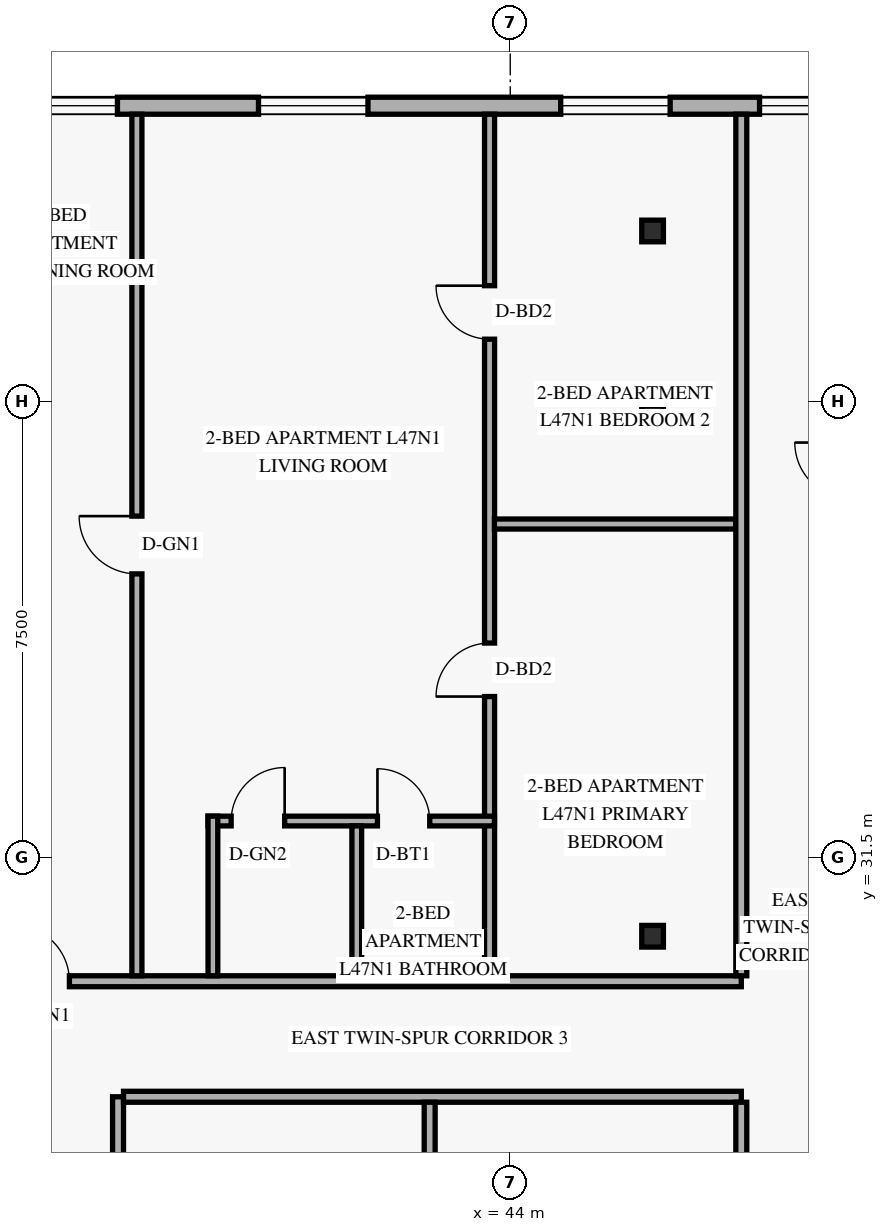
"""IFC4 building model, lengths in metres.
Left out: names, types, materials, properties, quantities, classifications, styles, units other than length and angle.
Written with IfcOpenShell. Run it as: python <this file> out.ifc"""

import sys

from ifc_helpers import new_model, si_unit, direction, frame, frame_2d, origin, origin_2d, place, context, subcontext, project, spatial, rectangle, hollow_rectangle, extrude, element, fill, save


model = new_model("IFC4")
c1 = context("Model", 3, precision=1e-05, world=origin(), true_north=direction((0.0, 1.0)))
c2 = subcontext(c1, "Body", "Model", "MODEL_VIEW")
j1 = project(units=[si_unit("LENGTHUNIT", "METRE"), si_unit("PLANEANGLEUNIT", "RADIAN")], contexts=[c1])
p1 = place(None, origin())
s1 = spatial("IfcSite", under=j1, at=p1, CompositionType="ELEMENT")
p2 = place(p1, origin())
s2 = spatial("IfcBuilding", under=s1, at=p2, CompositionType="ELEMENT")
p3 = place(p2, frame((0.0, 0.0, 181.2)))
s3 = spatial("IfcBuildingStorey", under=s2, at=p3, CompositionType="ELEMENT", Elevation=181.2)
for number, where, z_axis, x_axis in (
    (1, (46.278, 30.2, 0.0), (0.035, 0.0, 0.999), (0.0, 1.0, 0.0)),
    (2, (46.278, 38.75, 0.0), (0.035, 0.0, 0.999), (0.0, 1.0, 0.0)),
    (3, (46.278, 41.8, 0.0), (0.035, 0.0, 0.999), (0.0, 1.0, 0.0)),
):
    element("IfcColumn", number, at=place(p3, frame(where, z_axis=z_axis, x_axis=x_axis)), inside=s3, PredefinedType="COLUMN", context=c2, shape_type="SweptSolid", body=[
        extrude(hollow_rectangle(XDim=0.356, YDim=0.356, WallThickness=0.016, at=origin_2d()), origin(), (0.0, 0.0, 1.0), 3.602),
    ])
p4 = place(p3, frame((54.98, 43.86, 0.0), z_axis=(0.0, 0.0, 1.0), x_axis=(-1.0, 0.0, 0.0)))
e4 = element("IfcWall", 4, at=p4, inside=s3, PredefinedType="SOLIDWALL", context=c2, shape_type="SweptSolid", body=[
    extrude(rectangle(XDim=33.76, YDim=0.28, at=frame_2d((16.88, 0.0))), origin(), (0.0, 0.0, 1.0), 3.36),
])
p5 = place(p4, frame((28.055, 0.0, 0.85)))
e5 = element("IfcOpeningElement", 5, at=p5, cuts=e4, PredefinedType="OPENING", context=c2, shape_type="SweptSolid", body=[
    extrude(rectangle(XDim=1.8, YDim=1.6, at=frame_2d((0.9, 0.8))), frame((0.0, 0.15, 0.0), z_axis=(0.0, -1.0, 0.0), x_axis=(1.0, 0.0, 0.0)), (0.0, 0.0, 1.0), 0.3),
])
p6 = place(p4, frame((21.17, 0.0, 0.85)))
e6 = element("IfcOpeningElement", 6, at=p6, cuts=e4, PredefinedType="OPENING", context=c2, shape_type="SweptSolid", body=[
    extrude(rectangle(XDim=1.8, YDim=1.6, at=frame_2d((0.9, 0.8))), frame((0.0, 0.15, 0.0), z_axis=(0.0, -1.0, 0.0), x_axis=(1.0, 0.0, 0.0)), (0.0, 0.0, 1.0), 0.3),
])
p7 = place(p4, frame((17.44, 0.0, 0.85)))
e7 = element("IfcOpeningElement", 7, at=p7, cuts=e4, PredefinedType="OPENING", context=c2, shape_type="SweptSolid", body=[
    extrude(rectangle(XDim=1.8, YDim=1.6, at=frame_2d((0.9, 0.8))), frame((0.0, 0.15, 0.0), z_axis=(0.0, -1.0, 0.0), x_axis=(1.0, 0.0, 0.0)), (0.0, 0.0, 1.0), 0.3),
])
p8 = place(p4, frame((13.32, 0.0, 0.85)))
e8 = element("IfcOpeningElement", 8, at=p8, cuts=e4, PredefinedType="OPENING", context=c2, shape_type="SweptSolid", body=[
    extrude(rectangle(XDim=1.8, YDim=1.6, at=frame_2d((0.9, 0.8))), frame((0.0, 0.15, 0.0), z_axis=(0.0, -1.0, 0.0), x_axis=(1.0, 0.0, 0.0)), (0.0, 0.0, 1.0), 0.3),
])
p9 = place(p4, frame((8.35, 0.0, 0.85)))
e9 = element("IfcOpeningElement", 9, at=p9, cuts=e4, PredefinedType="OPENING", context=c2, shape_type="SweptSolid", body=[
    extrude(rectangle(XDim=1.8, YDim=1.6, at=frame_2d((0.9, 0.8))), frame((0.0, 0.15, 0.0), z_axis=(0.0, -1.0, 0.0), x_axis=(1.0, 0.0, 0.0)), (0.0, 0.0, 1.0), 0.3),
])
p10 = place(p4, frame((5.68, 0.0, 0.85)))
e10 = element("IfcOpeningElement", 10, at=p10, cuts=e4, PredefinedType="OPENING", context=c2, shape_type="SweptSolid", body=[
    extrude(rectangle(XDim=1.2, YDim=1.5, at=frame_2d((0.6, 0.75))), frame((0.0, 0.15, 0.0), z_axis=(0.0, -1.0, 0.0), x_axis=(1.0, 0.0, 0.0)), (0.0, 0.0, 1.0), 0.3),
])
p11 = place(p4, frame((1.79, 0.0, 0.85)))
e11 = element("IfcOpeningElement", 11, at=p11, cuts=e4, PredefinedType="OPENING", context=c2, shape_type="SweptSolid", body=[
    extrude(rectangle(XDim=1.8, YDim=1.6, at=frame_2d((0.9, 0.8))), frame((0.0, 0.15, 0.0), z_axis=(0.0, -1.0, 0.0), x_axis=(1.0, 0.0, 0.0)), (0.0, 0.0, 1.0), 0.3),
])
p12 = place(p3, frame((37.55, 17.28, 0.0), z_axis=(0.0, 0.0, 1.0), x_axis=(0.0, 1.0, 0.0)))
e12 = element("IfcWall", 12, at=p12, inside=s3, PredefinedType="STANDARD", context=c2, shape_type="SweptSolid", body=[
    extrude(rectangle(XDim=10.28, YDim=0.18, at=frame_2d((5.14, 0.0))), origin(), (0.0, 0.0, 1.0), 2.73),
])
p13 = place(p12, frame((1.94, 0.0, 0.0)))
e13 = element("IfcOpeningElement", 13, at=p13, cuts=e12, PredefinedType="OPENING", context=c2, shape_type="SweptSolid", body=[
    extrude(rectangle(XDim=0.95, YDim=2.15, at=frame_2d((0.475, 1.075))), frame((0.0, 0.1, 0.0), z_axis=(0.0, -1.0, 0.0), x_axis=(1.0, 0.0, 0.0)), (0.0, 0.0, 1.0), 0.2),
])
p14 = place(p12, frame((6.99, 0.0, 0.0)))
e14 = element("IfcOpeningElement", 14, at=p14, cuts=e12, PredefinedType="OPENING", context=c2, shape_type="SweptSolid", body=[
    extrude(rectangle(XDim=0.95, YDim=2.15, at=frame_2d((0.475, 1.075))), frame((0.0, 0.1, 0.0), z_axis=(0.0, -1.0, 0.0), x_axis=(1.0, 0.0, 0.0)), (0.0, 0.0, 1.0), 0.2),
])
p15 = place(p3, frame((37.64, 27.56, 0.0), z_axis=(0.0, 0.0, 1.0), x_axis=(1.0, 0.0, 0.0)))
e15 = element("IfcWall", 15, at=p15, inside=s3, PredefinedType="STANDARD", context=c2, shape_type="SweptSolid", body=[
    extrude(rectangle(XDim=10.16, YDim=0.18, at=frame_2d((5.08, 0.0))), origin(), (0.0, 0.0, 1.0), 2.73),
])
p16 = place(p3, frame((35.51, 29.46, 0.0), z_axis=(0.0, 0.0, 1.0), x_axis=(1.0, 0.0, 0.0)))
e16 = element("IfcWall", 16, at=p16, inside=s3, PredefinedType="STANDARD", context=c2, shape_type="SweptSolid", body=[
    extrude(rectangle(XDim=12.29, YDim=0.18, at=frame_2d((6.145, 0.0))), origin(), (0.0, 0.0, 1.0), 2.73),
])
p17 = place(p16, frame((0.32, 0.0, 0.0)))
e17 = element("IfcOpeningElement", 17, at=p17, cuts=e16, PredefinedType="OPENING", context=c2, shape_type="SweptSolid", body=[
    extrude(rectangle(XDim=0.92, YDim=2.15, at=frame_2d((0.46, 1.075))), frame((0.0, 0.1, 0.0), z_axis=(0.0, -1.0, 0.0), x_axis=(1.0, 0.0, 0.0)), (0.0, 0.0, 1.0), 0.2),
])
p18 = place(p3, frame((43.66, 29.55, 0.0), z_axis=(0.0, 0.0, 1.0), x_axis=(0.0, 1.0, 0.0)))
e18 = element("IfcWall", 18, at=p18, inside=s3, PredefinedType="PARTITIONING", context=c2, shape_type="SweptSolid", body=[
    extrude(rectangle(XDim=14.17, YDim=0.165, at=frame_2d((7.085, 0.0))), origin(), (0.0, 0.0, 1.0), 2.73),
])
p19 = place(p18, frame((4.593, 0.0, 0.0)))
e19 = element("IfcOpeningElement", 19, at=p19, cuts=e18, PredefinedType="OPENING", context=c2, shape_type="SweptSolid", body=[
    extrude(rectangle(XDim=0.88, YDim=2.14, at=frame_2d((0.44, 1.07))), frame((0.0, 0.093, 0.0), z_axis=(0.0, -1.0, 0.0), x_axis=(1.0, 0.0, 0.0)), (0.0, 0.0, 1.0), 0.185),
])
p20 = place(p18, frame((10.47, 0.0, 0.0)))
e20 = element("IfcOpeningElement", 20, at=p20, cuts=e18, PredefinedType="OPENING", context=c2, shape_type="SweptSolid", body=[
    extrude(rectangle(XDim=0.88, YDim=2.14, at=frame_2d((0.44, 1.07))), frame((0.0, 0.093, 0.0), z_axis=(0.0, -1.0, 0.0), x_axis=(1.0, 0.0, 0.0)), (0.0, 0.0, 1.0), 0.185),
])
p21 = place(p3, frame((39.03, 32.095, 0.0), z_axis=(0.0, 0.0, 1.0), x_axis=(1.0, 0.0, 0.0)))
e21 = element("IfcWall", 21, at=p21, inside=s3, PredefinedType="PLUMBINGWALL", context=c2, shape_type="SweptSolid", body=[
    extrude(rectangle(XDim=4.71, YDim=0.16, at=frame_2d((2.355, 0.0))), origin(), (0.0, 0.0, 1.0), 3.36),
])
p22 = place(p21, frame((0.38, 0.0, 0.0)))
e22 = element("IfcOpeningElement", 22, at=p22, cuts=e21, PredefinedType="OPENING", context=c2, shape_type="SweptSolid", body=[
    extrude(rectangle(XDim=0.88, YDim=2.12, at=frame_2d((0.44, 1.06))), frame((0.0, 0.09, 0.0), z_axis=(0.0, -1.0, 0.0), x_axis=(1.0, 0.0, 0.0)), (0.0, 0.0, 1.0), 0.18),
])
p23 = place(p21, frame((2.786, 0.0, 0.0)))
e23 = element("IfcOpeningElement", 23, at=p23, cuts=e21, PredefinedType="OPENING", context=c2, shape_type="SweptSolid", body=[
    extrude(rectangle(XDim=0.86, YDim=2.12, at=frame_2d((0.43, 1.06))), frame((0.0, 0.09, 0.0), z_axis=(0.0, -1.0, 0.0), x_axis=(1.0, 0.0, 0.0)), (0.0, 0.0, 1.0), 0.18),
])
p24 = place(p3, frame((39.11, 29.55, 0.0), z_axis=(0.0, 0.0, 1.0), x_axis=(0.0, 1.0, 0.0)))
e24 = element("IfcWall", 24, at=p24, inside=s3, PredefinedType="PLUMBINGWALL", context=c2, shape_type="SweptSolid", body=[
    extrude(rectangle(XDim=2.625, YDim=0.16, at=frame_2d((1.312, 0.0))), origin(), (0.0, 0.0, 1.0), 2.73),
])
p25 = place(p3, frame((41.476, 29.55, 0.0), z_axis=(0.0, 0.0, 1.0), x_axis=(0.0, 1.0, 0.0)))
e25 = element("IfcWall", 25, at=p25, inside=s3, PredefinedType="PLUMBINGWALL", context=c2, shape_type="SweptSolid", body=[
    extrude(rectangle(XDim=2.465, YDim=0.16, at=frame_2d((1.232, 0.0))), origin(), (0.0, 0.0, 1.0), 2.73),
])
p26 = place(p3, frame((37.86, 29.55, 0.0), z_axis=(0.0, 0.0, 1.0), x_axis=(0.0, 1.0, 0.0)))
e26 = element("IfcWall", 26, at=p26, inside=s3, PredefinedType="PARTITIONING", context=c2, shape_type="SweptSolid", body=[
    extrude(rectangle(XDim=14.17, YDim=0.165, at=frame_2d((7.085, 0.0))), origin(), (0.0, 0.0, 1.0), 2.73),
])
p27 = place(p26, frame((6.61, 0.0, 0.0)))
e27 = element("IfcOpeningElement", 27, at=p27, cuts=e26, PredefinedType="OPENING", context=c2, shape_type="SweptSolid", body=[
    extrude(rectangle(XDim=0.95, YDim=2.15, at=frame_2d((0.475, 1.075))), frame((0.0, 0.093, 0.0), z_axis=(0.0, -1.0, 0.0), x_axis=(1.0, 0.0, 0.0)), (0.0, 0.0, 1.0), 0.185),
])
p28 = place(p3, frame((43.74, 36.98, 0.0), z_axis=(0.0, 0.0, 1.0), x_axis=(1.0, 0.0, 0.0)))
e28 = element("IfcWall", 28, at=p28, inside=s3, PredefinedType="PARTITIONING", context=c2, shape_type="SweptSolid", body=[
    extrude(rectangle(XDim=3.97, YDim=0.165, at=frame_2d((1.985, 0.0))), origin(), (0.0, 0.0, 1.0), 2.73),
])
p29 = place(p3, frame((42.675, 17.37, 0.0), z_axis=(0.0, 0.0, 1.0), x_axis=(0.0, 1.0, 0.0)))
e29 = element("IfcWall", 29, at=p29, inside=s3, PredefinedType="PARTITIONING", context=c2, shape_type="SweptSolid", body=[
    extrude(rectangle(XDim=10.1, YDim=0.18, at=frame_2d((5.05, 0.0))), origin(), (0.0, 0.0, 1.0), 2.73),
])
p30 = place(p3, frame((47.8, 17.37, 0.0), z_axis=(0.0, 0.0, 1.0), x_axis=(0.0, 1.0, 0.0)))
e30 = element("IfcWall", 30, at=p30, inside=s3, PredefinedType="STANDARD", context=c2, shape_type="SweptSolid", body=[
    extrude(rectangle(XDim=10.1, YDim=0.18, at=frame_2d((5.05, 0.0))), origin(), (0.0, 0.0, 1.0), 2.73),
])
p31 = place(p3, frame((47.8, 29.55, 0.0), z_axis=(0.0, 0.0, 1.0), x_axis=(0.0, 1.0, 0.0)))
e31 = element("IfcWall", 31, at=p31, inside=s3, PredefinedType="STANDARD", context=c2, shape_type="SweptSolid", body=[
    extrude(rectangle(XDim=14.17, YDim=0.18, at=frame_2d((7.085, 0.0))), origin(), (0.0, 0.0, 1.0), 2.73),
])
p32 = place(p7, origin())
e32 = element("IfcWindow", 32, at=p32, inside=s3, PartitioningType="SINGLE_PANEL", PredefinedType="WINDOW", context=c2, shape_type="SweptSolid", body=[
    extrude(rectangle(XDim=1.8, YDim=1.6, at=frame_2d((0.9, 0.8))), frame((0.0, 0.03, 0.0), z_axis=(0.0, -1.0, 0.0), x_axis=(1.0, 0.0, 0.0)), (0.0, 0.0, 1.0), 0.06),
])
fill(e7, e32)
p33 = place(p8, origin())
e33 = element("IfcWindow", 33, at=p33, inside=s3, PartitioningType="SINGLE_PANEL", PredefinedType="WINDOW", context=c2, shape_type="SweptSolid", body=[
    extrude(rectangle(XDim=1.8, YDim=1.6, at=frame_2d((0.9, 0.8))), frame((0.0, 0.03, 0.0), z_axis=(0.0, -1.0, 0.0), x_axis=(1.0, 0.0, 0.0)), (0.0, 0.0, 1.0), 0.06),
])
fill(e8, e33)
p34 = place(p9, origin())
e34 = element("IfcWindow", 34, at=p34, inside=s3, PartitioningType="SINGLE_PANEL", PredefinedType="WINDOW", context=c2, shape_type="SweptSolid", body=[
    extrude(rectangle(XDim=1.8, YDim=1.6, at=frame_2d((0.9, 0.8))), frame((0.0, 0.03, 0.0), z_axis=(0.0, -1.0, 0.0), x_axis=(1.0, 0.0, 0.0)), (0.0, 0.0, 1.0), 0.06),
])
fill(e9, e34)
p35 = place(p10, origin())
e35 = element("IfcWindow", 35, at=p35, inside=s3, PartitioningType="SINGLE_PANEL", PredefinedType="WINDOW", context=c2, shape_type="SweptSolid", body=[
    extrude(rectangle(XDim=1.2, YDim=1.5, at=frame_2d((0.6, 0.75))), frame((0.0, 0.03, 0.0), z_axis=(0.0, -1.0, 0.0), x_axis=(1.0, 0.0, 0.0)), (0.0, 0.0, 1.0), 0.06),
])
fill(e10, e35)
p36 = place(p27, origin())
e36 = element("IfcDoor", 36, at=p36, inside=s3, OperationType="SINGLE_SWING_RIGHT", PredefinedType="DOOR", context=c2, shape_type="SweptSolid", body=[
    extrude(rectangle(XDim=0.95, YDim=2.15, at=frame_2d((0.475, 1.075))), frame((0.0, 0.025, 0.0), z_axis=(0.0, -1.0, 0.0), x_axis=(1.0, 0.0, 0.0)), (0.0, 0.0, 1.0), 0.05),
])
fill(e27, e36)
p37 = place(p17, origin())
e37 = element("IfcDoor", 37, at=p37, inside=s3, OperationType="SINGLE_SWING_LEFT", PredefinedType="DOOR", context=c2, shape_type="SweptSolid", body=[
    extrude(rectangle(XDim=0.92, YDim=2.15, at=frame_2d((0.46, 1.075))), frame((0.0, 0.025, 0.0), z_axis=(0.0, -1.0, 0.0), x_axis=(1.0, 0.0, 0.0)), (0.0, 0.0, 1.0), 0.05),
])
fill(e17, e37)
p38 = place(p22, origin())
e38 = element("IfcDoor", 38, at=p38, inside=s3, OperationType="SINGLE_SWING_RIGHT", PredefinedType="DOOR", context=c2, shape_type="SweptSolid", body=[
    extrude(rectangle(XDim=0.88, YDim=2.12, at=frame_2d((0.44, 1.06))), frame((0.0, 0.025, 0.0), z_axis=(0.0, -1.0, 0.0), x_axis=(1.0, 0.0, 0.0)), (0.0, 0.0, 1.0), 0.05),
])
fill(e22, e38)
p39 = place(p23, origin())
e39 = element("IfcDoor", 39, at=p39, inside=s3, OperationType="SINGLE_SWING_LEFT", PredefinedType="DOOR", context=c2, shape_type="SweptSolid", body=[
    extrude(rectangle(XDim=0.86, YDim=2.12, at=frame_2d((0.43, 1.06))), frame((0.0, 0.025, 0.0), z_axis=(0.0, -1.0, 0.0), x_axis=(1.0, 0.0, 0.0)), (0.0, 0.0, 1.0), 0.05),
])
fill(e23, e39)
p40 = place(p19, origin())
e40 = element("IfcDoor", 40, at=p40, inside=s3, OperationType="SINGLE_SWING_LEFT", PredefinedType="DOOR", context=c2, shape_type="SweptSolid", body=[
    extrude(rectangle(XDim=0.88, YDim=2.14, at=frame_2d((0.44, 1.07))), frame((0.0, 0.025, 0.0), z_axis=(0.0, -1.0, 0.0), x_axis=(1.0, 0.0, 0.0)), (0.0, 0.0, 1.0), 0.05),
])
fill(e19, e40)
p41 = place(p20, origin())
e41 = element("IfcDoor", 41, at=p41, inside=s3, OperationType="SINGLE_SWING_RIGHT", PredefinedType="DOOR", context=c2, shape_type="SweptSolid", body=[
    extrude(rectangle(XDim=0.88, YDim=2.14, at=frame_2d((0.44, 1.07))), frame((0.0, 0.025, 0.0), z_axis=(0.0, -1.0, 0.0), x_axis=(1.0, 0.0, 0.0)), (0.0, 0.0, 1.0), 0.05),
])
fill(e20, e41)
save(model, sys.argv[1])
